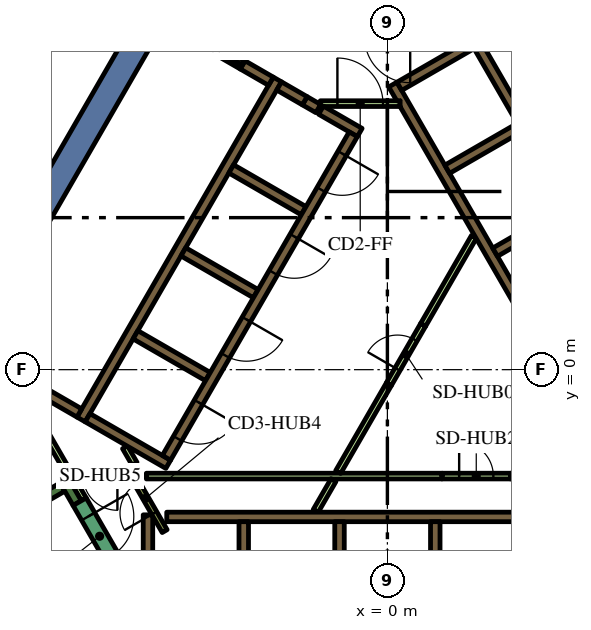
"""IFC4 building model, lengths in metres.
Left out: names, types, materials, properties, quantities, classifications, styles, units other than length and angle.
Written with IfcOpenShell. Run it as: python <this file> out.ifc"""

import sys

from ifc_helpers import new_model, si_unit, direction, frame, frame_2d, origin, place, context, subcontext, project, spatial, polyline, rectangle, outline, extrude, element, fill, save


model = new_model("IFC4")
c1 = context("Model", 3, precision=1e-05, world=origin(), true_north=direction((0.0, 1.0)))
c2 = subcontext(c1, "Body", "Model", "MODEL_VIEW")
j1 = project(units=[si_unit("LENGTHUNIT", "METRE"), si_unit("PLANEANGLEUNIT", "RADIAN")], contexts=[c1])
p1 = place(None, origin())
s1 = spatial("IfcSite", under=j1, at=p1, CompositionType="ELEMENT")
p2 = place(p1, origin())
s2 = spatial("IfcBuilding", under=s1, at=p2, CompositionType="ELEMENT")
p3 = place(p2, frame((0.0, 0.0, 210.0)))
s3 = spatial("IfcBuildingStorey", under=s2, at=p3, CompositionType="ELEMENT", Elevation=210.0)
p4 = place(p3, frame((8.235, 5.736, 0.0), z_axis=(0.0, 0.0, 1.0), x_axis=(-0.499983401189, 0.8660349869, 0.0)))
e1 = element("IfcWall", 1, at=p4, inside=s3, PredefinedType="SOLIDWALL", context=c2, shape_type="SweptSolid", body=[
    extrude(rectangle(XDim=12.472, YDim=0.7, at=frame_2d((6.236, 0.0))), origin(), (0.0, 0.0, 1.0), 4.2),
])
p5 = place(p3, frame((-4.696, 11.867, 0.0), z_axis=(0.0, 0.0, 1.0), x_axis=(-0.500003726532, -0.866023252259, 0.0)))
e2 = element("IfcWall", 2, at=p5, inside=s3, PredefinedType="SOLIDWALL", context=c2, shape_type="SweptSolid", body=[
    extrude(rectangle(XDim=12.848, YDim=0.7, at=frame_2d((6.424, 0.0))), origin(), (0.0, 0.0, 1.0), 4.2),
])
p6 = place(p3, frame((-14.44, -6.49, 0.0), z_axis=(0.0, 0.0, 1.0), x_axis=(0.866022966069, 0.500004222222, 0.0)))
e3 = element("IfcWall", 3, at=p6, inside=s3, PredefinedType="SOLIDWALL", context=c2, shape_type="SweptSolid", body=[
    extrude(rectangle(XDim=6.8, YDim=0.25, at=frame_2d((3.4, 0.0))), origin(), (0.0, 0.0, 1.0), 4.2),
])
p7 = place(p3, frame((-8.163, -3.511, 0.0), z_axis=(0.0, 0.0, 1.0), x_axis=(-0.499994068514, 0.866028828302, 0.0)))
e4 = element("IfcWall", 4, at=p7, inside=s3, PredefinedType="SOLIDWALL", context=c2, shape_type="SweptSolid", body=[
    extrude(rectangle(XDim=0.674, YDim=0.25, at=frame_2d((0.337, 0.0))), origin(), (0.0, 0.0, 1.0), 4.2),
])
p8 = place(p3, frame((-6.3, -9.05, 0.0), z_axis=(0.0, 0.0, 1.0), x_axis=(0.0, 1.0, 0.0)))
e5 = element("IfcWall", 5, at=p8, inside=s3, PredefinedType="SOLIDWALL", context=c2, shape_type="SweptSolid", body=[
    extrude(rectangle(XDim=5.23, YDim=0.25, at=frame_2d((2.615, 0.0))), origin(), (0.0, 0.0, 1.0), 4.2),
])
p9 = place(p3, frame((-5.806, -3.875, 0.0), z_axis=(0.0, 0.0, 1.0), x_axis=(1.0, 0.0, 0.0)))
e6 = element("IfcWall", 6, at=p9, inside=s3, PredefinedType="SOLIDWALL", context=c2, shape_type="SweptSolid", body=[
    extrude(rectangle(XDim=12.231, YDim=0.25, at=frame_2d((6.116, 0.0))), origin(), (0.0, 0.0, 1.0), 4.2),
])
for number, where, z_axis, x_axis in (
    (7, (1.26, -4.0, 0.0), (0.0, 0.0, 1.0), (0.0, -1.0, 0.0)),
    (8, (-1.26, -4.0, 0.0), (0.0, 0.0, 1.0), (0.0, -1.0, 0.0)),
    (9, (-3.78, -4.0, 0.0), (0.0, 0.0, 1.0), (0.0, -1.0, 0.0)),
):
    element("IfcWall", number, at=place(p3, frame(where, z_axis=z_axis, x_axis=x_axis)), inside=s3, PredefinedType="SOLIDWALL", context=c2, shape_type="SweptSolid", body=[
        extrude(rectangle(XDim=2.2, YDim=0.25, at=frame_2d((1.1, 0.0))), origin(), (0.0, 0.0, 1.0), 4.2),
    ])
p10 = place(p3, origin())
e10 = element("IfcWall", 10, at=p10, inside=s3, PredefinedType="SOLIDWALL", context=c2, shape_type="SweptSolid", body=[
    extrude(outline(polyline([(0.332, 6.925), (0.335, 6.925), (0.335, 6.925), (0.335, 6.925), (0.335, 7.075), (0.335, 7.075), (0.335, 7.075), (0.245, 7.075), (0.035, 7.439), (0.252, 7.564), (0.377, 7.348), (1.512, 5.382), (1.637, 5.165), (2.221, 4.153), (2.771, 3.199), (2.896, 2.983), (3.138, 2.564), (4.031, 1.017), (4.156, 0.801), (5.292, -1.165), (5.417, -1.382), (6.073, -2.519), (6.552, -3.348), (6.677, -3.564), (6.46, -3.689), (0.332, 6.925)])), origin(), (0.0, 0.0, 1.0), 4.2),
])
p11 = place(p3, frame((3.1, 9.064, 0.0), z_axis=(0.0, 0.0, 1.0), x_axis=(-0.866030133475, -0.499991807846, 0.0)))
e11 = element("IfcWall", 11, at=p11, inside=s3, PredefinedType="SOLIDWALL", context=c2, shape_type="SweptSolid", body=[
    extrude(rectangle(XDim=3.217, YDim=0.25, at=frame_2d((1.608, 0.0))), origin(), (0.0, 0.0, 1.0), 4.2),
])
p12 = place(p3, frame((1.574, 5.274, 0.0), z_axis=(0.0, 0.0, 1.0), x_axis=(0.866028486751, 0.499994660107, 0.0)))
e12 = element("IfcWall", 12, at=p12, inside=s3, PredefinedType="SOLIDWALL", context=c2, shape_type="SweptSolid", body=[
    extrude(rectangle(XDim=2.2, YDim=0.25, at=frame_2d((1.1, 0.0))), origin(), (0.0, 0.0, 1.0), 4.2),
])
p13 = place(p3, frame((2.834, 3.091, 0.0), z_axis=(0.0, 0.0, 1.0), x_axis=(0.866008176907, 0.50002983664, 0.0)))
e13 = element("IfcWall", 13, at=p13, inside=s3, PredefinedType="SOLIDWALL", context=c2, shape_type="SweptSolid", body=[
    extrude(rectangle(XDim=2.2, YDim=0.25, at=frame_2d((1.1, 0.0))), origin(), (0.0, 0.0, 1.0), 4.2),
])
p14 = place(p3, frame((-8.06, -1.311, 0.0), z_axis=(0.0, 0.0, 1.0), x_axis=(0.50000273126, 0.866023826885, 0.0)))
e14 = element("IfcWall", 14, at=p14, inside=s3, PredefinedType="SOLIDWALL", context=c2, shape_type="SweptSolid", body=[
    extrude(rectangle(XDim=10.33, YDim=0.25, at=frame_2d((5.165, 0.0))), origin(), (0.0, 0.0, 1.0), 4.2),
])
p15 = place(p3, frame((-1.819, 6.87, 0.0), z_axis=(0.0, 0.0, 1.0), x_axis=(-0.866294599386, 0.499533449405, 0.0)))
e15 = element("IfcWall", 15, at=p15, inside=s3, PredefinedType="SOLIDWALL", context=c2, shape_type="SweptSolid", body=[
    extrude(rectangle(XDim=0.41, YDim=0.25, at=frame_2d((0.205, 0.0))), origin(), (0.0, 0.0, 1.0), 4.2),
])
p16 = place(p3, frame((-2.849, 7.465, 0.0), z_axis=(0.0, 0.0, 1.0), x_axis=(0.865955664968, -0.500120771724, 0.0)))
e16 = element("IfcWall", 16, at=p16, inside=s3, PredefinedType="SOLIDWALL", context=c2, shape_type="SweptSolid", body=[
    extrude(rectangle(XDim=0.778, YDim=0.25, at=frame_2d((0.389, 0.0))), origin(), (0.0, 0.0, 1.0), 4.2),
])
p17 = place(p3, frame((-0.728, 6.24, 0.0), z_axis=(0.0, 0.0, 1.0), x_axis=(-0.866002680491, 0.500039355833, 0.0)))
e17 = element("IfcWall", 17, at=p17, inside=s3, PredefinedType="SOLIDWALL", context=c2, shape_type="SweptSolid", body=[
    extrude(rectangle(XDim=1.178, YDim=0.25, at=frame_2d((0.589, 0.0))), origin(), (0.0, 0.0, 1.0), 4.2),
])
for number, where, z_axis, x_axis in (
    (18, (-2.204, 4.182, 0.0), (0.0, 0.0, 1.0), (-0.866, 0.5, 0.0)),
    (19, (-5.369, 3.1, 0.0), (0.0, 0.0, 1.0), (0.866, -0.5, 0.0)),
    (20, (-4.724, -0.182, 0.0), (0.0, 0.0, 1.0), (-0.866, 0.5, 0.0)),
):
    element("IfcWall", number, at=place(p3, frame(where, z_axis=z_axis, x_axis=x_axis)), inside=s3, PredefinedType="SOLIDWALL", context=c2, shape_type="SweptSolid", body=[
        extrude(rectangle(XDim=2.2, YDim=0.25, at=frame_2d((1.1, 0.0))), origin(), (0.0, 0.0, 1.0), 4.2),
    ])
p18 = place(p3, frame((-7.889, -1.265, 0.0), z_axis=(0.0, 0.0, 1.0), x_axis=(0.866057815567, -0.499943856944, 0.0)))
e21 = element("IfcWall", 21, at=p18, inside=s3, PredefinedType="SOLIDWALL", context=c2, shape_type="SweptSolid", body=[
    extrude(rectangle(XDim=2.45, YDim=0.25, at=frame_2d((1.225, 0.0))), origin(), (0.0, 0.0, 1.0), 4.2),
])
p19 = place(p3, frame((-9.95, -0.075, 0.0), z_axis=(0.0, 0.0, 1.0), x_axis=(0.865962177421, -0.500109495288, 0.0)))
e22 = element("IfcWall", 22, at=p19, inside=s3, PredefinedType="SOLIDWALL", context=c2, shape_type="SweptSolid", body=[
    extrude(rectangle(XDim=2.129, YDim=0.25, at=frame_2d((1.065, 0.0))), origin(), (0.0, 0.0, 1.0), 4.2),
])
p20 = place(p3, frame((-3.809, 8.019, 0.0), z_axis=(0.0, 0.0, 1.0), x_axis=(0.866010229787, -0.500026281214, 0.0)))
e23 = element("IfcWall", 23, at=p20, inside=s3, PredefinedType="SOLIDWALL", context=c2, shape_type="SweptSolid", body=[
    extrude(rectangle(XDim=0.858, YDim=0.25, at=frame_2d((0.429, 0.0))), origin(), (0.0, 0.0, 1.0), 4.2),
])
e24 = element("IfcWall", 24, at=p10, inside=s3, PredefinedType="SOLIDWALL", context=c2, shape_type="SweptSolid", body=[
    extrude(outline(polyline([(-3.748, 8.128), (-3.813, 8.015), (-4.027, 8.139), (-4.017, 8.156), (-4.008, 8.173), (-4.0, 8.192), (-3.995, 8.21), (-3.991, 8.23), (-3.99, 8.25), (-3.99, 8.268), (-3.748, 8.128)])), origin(), (0.0, 0.0, 1.0), 4.2),
])
p21 = place(p3, frame((-9.718, -0.417, 0.0), z_axis=(0.0, 0.0, 1.0), x_axis=(0.499966538646, -0.866044721844, 0.0)))
e25 = element("IfcWall", 25, at=p21, inside=s3, PredefinedType="PARTITIONING", context=c2, shape_type="SweptSolid", body=[
    extrude(rectangle(XDim=2.511, YDim=0.15, at=frame_2d((1.255, 0.0))), origin(), (0.0, 0.0, 1.0), 3.45),
])
p22 = place(p3, frame((0.941, 1.179, 0.0), z_axis=(0.0, 0.0, 1.0), x_axis=(0.499962406319, 0.866047107418, 0.0)))
e26 = element("IfcWall", 26, at=p22, inside=s3, PredefinedType="PARTITIONING", context=c2, shape_type="SweptSolid", body=[
    extrude(rectangle(XDim=2.672, YDim=0.15, at=frame_2d((1.336, 0.0))), origin(), (0.0, 0.0, 1.0), 3.45),
])
p23 = place(p3, frame((1.438, -2.8, 0.0), z_axis=(0.0, 0.0, 1.0), x_axis=(-1.0, 0.0, 0.0)))
e27 = element("IfcWall", 27, at=p23, inside=s3, PredefinedType="PARTITIONING", context=c2, shape_type="SweptSolid", body=[
    extrude(rectangle(XDim=7.781, YDim=0.15, at=frame_2d((3.891, 0.0))), origin(), (0.0, 0.0, 1.0), 3.45),
])
p24 = place(p3, frame((-1.418, -2.907, 0.0), z_axis=(0.0, 0.0, 1.0), x_axis=(-0.499978056798, -0.866038072327, 0.0)))
e28 = element("IfcWall", 28, at=p24, inside=s3, PredefinedType="PARTITIONING", context=c2, shape_type="SweptSolid", body=[
    extrude(rectangle(XDim=0.937, YDim=0.15, at=frame_2d((0.469, 0.0))), origin(), (0.0, 0.0, 1.0), 3.45),
])
for number, where, z_axis, x_axis in (
    (29, (-1.295, -2.693, 0.0), (0.0, 0.0, 1.0), (0.5, 0.866, 0.0)),
    (30, (3.238, -2.8, 0.0), (0.0, 0.0, 1.0), (1.0, 0.0, 0.0)),
):
    element("IfcWall", number, at=place(p3, frame(where, z_axis=z_axis, x_axis=x_axis)), inside=s3, PredefinedType="PARTITIONING", context=c2, shape_type="SweptSolid", body=[
        extrude(rectangle(XDim=2.672, YDim=0.15, at=frame_2d((1.336, 0.0))), origin(), (0.0, 0.0, 1.0), 3.45),
    ])
p25 = place(p3, frame((-6.653, -2.477, 0.0), z_axis=(0.0, 0.0, 1.0), x_axis=(-0.500002592159, 0.866023907196, 0.0)))
e31 = element("IfcWall", 31, at=p25, inside=s3, PredefinedType="PARTITIONING", context=c2, shape_type="SweptSolid", body=[
    extrude(rectangle(XDim=0.503, YDim=0.15, at=frame_2d((0.251, 0.0))), origin(), (0.0, 0.0, 1.0), 3.45),
])
p26 = place(p3, frame((-7.99, -3.412, 0.0), z_axis=(0.0, 0.0, 1.0), x_axis=(-0.499858525911, 0.866107068482, 0.0)))
e32 = element("IfcWall", 32, at=p26, inside=s3, PredefinedType="PARTITIONING", context=c2, shape_type="SweptSolid", body=[
    extrude(rectangle(XDim=0.466, YDim=0.15, at=frame_2d((0.233, 0.0))), origin(), (0.0, 0.0, 1.0), 3.45),
])
p27 = place(p3, frame((8.565, -2.185, 0.0), z_axis=(0.0, 0.0, 1.0), x_axis=(-0.499997954832, 0.866026584559, 0.0)))
e33 = element("IfcWall", 33, at=p27, inside=s3, PredefinedType="SOLIDWALL", context=c2, shape_type="SweptSolid", body=[
    extrude(rectangle(XDim=12.35, YDim=0.25, at=frame_2d((6.175, 0.0))), origin(), (0.0, 0.0, 1.0), 4.2),
])
p28 = place(p27, frame((0.585, 0.0, 0.0)))
e34 = element("IfcOpeningElement", 34, at=p28, cuts=e33, PredefinedType="OPENING", context=c2, shape_type="SweptSolid", body=[
    extrude(rectangle(XDim=1.1, YDim=2.1, at=frame_2d((0.55, 1.05))), frame((0.0, 0.135, 0.0), z_axis=(0.0, -1.0, 0.0), x_axis=(1.0, 0.0, 0.0)), (0.0, 0.0, 1.0), 0.27),
])
p29 = place(p3, frame((-0.898, 6.194, 0.0), z_axis=(0.0, 0.0, 1.0), x_axis=(-0.499996202215, -0.866027596426, 0.0)))
e35 = element("IfcWall", 35, at=p29, inside=s3, PredefinedType="SOLIDWALL", context=c2, shape_type="SweptSolid", body=[
    extrude(rectangle(XDim=9.83, YDim=0.25, at=frame_2d((4.915, 0.0))), origin(), (0.0, 0.0, 1.0), 4.2),
])
p30 = place(p29, frame((0.585, 0.0, 0.0)))
e36 = element("IfcOpeningElement", 36, at=p30, cuts=e35, PredefinedType="OPENING", context=c2, shape_type="SweptSolid", body=[
    extrude(rectangle(XDim=1.1, YDim=2.1, at=frame_2d((0.55, 1.05))), frame((0.0, 0.135, 0.0), z_axis=(0.0, -1.0, 0.0), x_axis=(1.0, 0.0, 0.0)), (0.0, 0.0, 1.0), 0.27),
])
p31 = place(p29, frame((3.105, 0.0, 0.0)))
e37 = element("IfcOpeningElement", 37, at=p31, cuts=e35, PredefinedType="OPENING", context=c2, shape_type="SweptSolid", body=[
    extrude(rectangle(XDim=1.1, YDim=2.1, at=frame_2d((0.55, 1.05))), frame((0.0, 0.135, 0.0), z_axis=(0.0, -1.0, 0.0), x_axis=(1.0, 0.0, 0.0)), (0.0, 0.0, 1.0), 0.27),
])
p32 = place(p29, frame((5.625, 0.0, 0.0)))
e38 = element("IfcOpeningElement", 38, at=p32, cuts=e35, PredefinedType="OPENING", context=c2, shape_type="SweptSolid", body=[
    extrude(rectangle(XDim=1.1, YDim=2.1, at=frame_2d((0.55, 1.05))), frame((0.0, 0.135, 0.0), z_axis=(0.0, -1.0, 0.0), x_axis=(1.0, 0.0, 0.0)), (0.0, 0.0, 1.0), 0.27),
])
p33 = place(p29, frame((8.145, 0.0, 0.0)))
e39 = element("IfcOpeningElement", 39, at=p33, cuts=e35, PredefinedType="OPENING", context=c2, shape_type="SweptSolid", body=[
    extrude(rectangle(XDim=1.1, YDim=2.1, at=frame_2d((0.55, 1.05))), frame((0.0, 0.135, 0.0), z_axis=(0.0, -1.0, 0.0), x_axis=(1.0, 0.0, 0.0)), (0.0, 0.0, 1.0), 0.27),
])
p34 = place(p3, frame((-8.098, -3.474, 0.0), z_axis=(0.0, 0.0, 1.0), x_axis=(0.49994051562, -0.866059744384, 0.0)))
e40 = element("IfcWall", 40, at=p34, inside=s3, PredefinedType="SOLIDWALL", context=c2, shape_type="SweptSolid", body=[
    extrude(rectangle(XDim=2.1, YDim=0.4, at=frame_2d((1.05, 0.0))), origin(), (0.0, 0.0, 1.0), 4.2),
])
p35 = place(p34, frame((0.45, 0.0, 0.0)))
e41 = element("IfcOpeningElement", 41, at=p35, cuts=e40, PredefinedType="OPENING", context=c2, shape_type="SweptSolid", body=[
    extrude(rectangle(XDim=1.2, YDim=2.1, at=frame_2d((0.6, 1.05))), frame((0.0, 0.21, 0.0), z_axis=(0.0, -1.0, 0.0), x_axis=(1.0, 0.0, 0.0)), (0.0, 0.0, 1.0), 0.42),
])
p36 = place(p3, frame((-1.765, 7.0, 0.0), z_axis=(0.0, 0.0, 1.0), x_axis=(1.0, 0.0, 0.0)))
e42 = element("IfcWall", 42, at=p36, inside=s3, PredefinedType="PARTITIONING", context=c2, shape_type="SweptSolid", body=[
    extrude(rectangle(XDim=2.1, YDim=0.15, at=frame_2d((1.05, 0.0))), origin(), (0.0, 0.0, 1.0), 3.45),
])
p37 = place(p36, frame((0.45, 0.0, 0.0)))
e43 = element("IfcOpeningElement", 43, at=p37, cuts=e42, PredefinedType="OPENING", context=c2, shape_type="SweptSolid", body=[
    extrude(rectangle(XDim=1.2, YDim=2.1, at=frame_2d((0.6, 1.05))), frame((0.0, 0.085, 0.0), z_axis=(0.0, -1.0, 0.0), x_axis=(1.0, 0.0, 0.0)), (0.0, 0.0, 1.0), 0.17),
])
p38 = place(p3, frame((-5.861, -4.248, 0.0), z_axis=(0.0, 0.0, 1.0), x_axis=(-0.500043646338, 0.866000203093, 0.0)))
e44 = element("IfcWall", 44, at=p38, inside=s3, PredefinedType="PARTITIONING", context=c2, shape_type="SweptSolid", body=[
    extrude(rectangle(XDim=1.93, YDim=0.15, at=frame_2d((0.965, 0.0))), origin(), (0.0, 0.0, 1.0), 4.2),
])
p39 = place(p38, frame((0.55, 0.0, 0.0)))
e45 = element("IfcOpeningElement", 45, at=p39, cuts=e44, PredefinedType="OPENING", context=c2, shape_type="SweptSolid", body=[
    extrude(rectangle(XDim=0.9, YDim=2.1, at=frame_2d((0.45, 1.05))), frame((0.0, 0.085, 0.0), z_axis=(0.0, -1.0, 0.0), x_axis=(1.0, 0.0, 0.0)), (0.0, 0.0, 1.0), 0.17),
])
p40 = place(p3, frame((-5.659, 9.012, 0.0), z_axis=(0.0, 0.0, 1.0), x_axis=(0.866009402589, -0.500027713859, 0.0)))
e46 = element("IfcWall", 46, at=p40, inside=s3, PredefinedType="PARTITIONING", context=c2, shape_type="SweptSolid", body=[
    extrude(rectangle(XDim=2.1, YDim=0.12, at=frame_2d((1.05, 0.0))), origin(), (0.0, 0.0, 1.0), 3.45),
])
p41 = place(p40, frame((0.45, 0.0, 0.0)))
e47 = element("IfcOpeningElement", 47, at=p41, cuts=e46, PredefinedType="OPENING", context=c2, shape_type="SweptSolid", body=[
    extrude(rectangle(XDim=1.2, YDim=2.1, at=frame_2d((0.6, 1.05))), frame((0.0, 0.07, 0.0), z_axis=(0.0, -1.0, 0.0), x_axis=(1.0, 0.0, 0.0)), (0.0, 0.0, 1.0), 0.14),
])
p42 = place(p3, frame((0.041, -0.379, 0.0), z_axis=(0.0, 0.0, 1.0), x_axis=(0.499961193289, 0.866047807691, 0.0)))
e48 = element("IfcWall", 48, at=p42, inside=s3, PredefinedType="PARTITIONING", context=c2, shape_type="SweptSolid", body=[
    extrude(rectangle(XDim=1.8, YDim=0.15, at=frame_2d((0.9, 0.0))), origin(), (0.0, 0.0, 1.0), 3.45),
])
p43 = place(p42, frame((0.45, 0.0, 0.0)))
e49 = element("IfcOpeningElement", 49, at=p43, cuts=e48, PredefinedType="OPENING", context=c2, shape_type="SweptSolid", body=[
    extrude(rectangle(XDim=0.9, YDim=2.1, at=frame_2d((0.45, 1.05))), frame((0.0, 0.085, 0.0), z_axis=(0.0, -1.0, 0.0), x_axis=(1.0, 0.0, 0.0)), (0.0, 0.0, 1.0), 0.17),
])
p44 = place(p3, frame((1.438, -2.8, 0.0), z_axis=(0.0, 0.0, 1.0), x_axis=(1.0, 0.0, 0.0)))
e50 = element("IfcWall", 50, at=p44, inside=s3, PredefinedType="PARTITIONING", context=c2, shape_type="SweptSolid", body=[
    extrude(rectangle(XDim=1.8, YDim=0.15, at=frame_2d((0.9, 0.0))), origin(), (0.0, 0.0, 1.0), 3.45),
])
p45 = place(p44, frame((0.45, 0.0, 0.0)))
e51 = element("IfcOpeningElement", 51, at=p45, cuts=e50, PredefinedType="OPENING", context=c2, shape_type="SweptSolid", body=[
    extrude(rectangle(XDim=0.9, YDim=2.1, at=frame_2d((0.45, 1.05))), frame((0.0, 0.085, 0.0), z_axis=(0.0, -1.0, 0.0), x_axis=(1.0, 0.0, 0.0)), (0.0, 0.0, 1.0), 0.17),
])
p46 = place(p3, frame((-6.655, -2.8, 0.0), z_axis=(0.0, 0.0, 1.0), x_axis=(-1.0, 0.0, 0.0)))
e52 = element("IfcWall", 52, at=p46, inside=s3, PredefinedType="PARTITIONING", context=c2, shape_type="SweptSolid", body=[
    extrude(rectangle(XDim=1.8, YDim=0.15, at=frame_2d((0.9, 0.0))), origin(), (0.0, 0.0, 1.0), 3.45),
])
p47 = place(p46, frame((0.45, 0.0, 0.0)))
e53 = element("IfcOpeningElement", 53, at=p47, cuts=e52, PredefinedType="OPENING", context=c2, shape_type="SweptSolid", body=[
    extrude(rectangle(XDim=0.9, YDim=2.1, at=frame_2d((0.45, 1.05))), frame((0.0, 0.085, 0.0), z_axis=(0.0, -1.0, 0.0), x_axis=(1.0, 0.0, 0.0)), (0.0, 0.0, 1.0), 0.17),
])
p48 = place(p3, frame((-8.272, 9.972, 0.0), z_axis=(0.0, 0.0, 1.0), x_axis=(-0.5000018851, -0.866024315419, 0.0)))
e54 = element("IfcWall", 54, at=p48, inside=s3, PredefinedType="PARTITIONING", context=c2, shape_type="SweptSolid", body=[
    extrude(rectangle(XDim=9.0, YDim=0.2, at=frame_2d((4.5, 0.0))), origin(), (0.0, 0.0, 1.0), 3.45),
])
p49 = place(p30, origin())
e55 = element("IfcDoor", 55, at=p49, inside=s3, OperationType="DOUBLE_DOOR_SLIDING", PredefinedType="DOOR", context=c2, shape_type="SweptSolid", body=[
    extrude(rectangle(XDim=1.1, YDim=2.1, at=frame_2d((0.55, 1.05))), frame((0.0, 0.025, 0.0), z_axis=(0.0, -1.0, 0.0), x_axis=(1.0, 0.0, 0.0)), (0.0, 0.0, 1.0), 0.05),
])
fill(e36, e55)
p50 = place(p31, origin())
e56 = element("IfcDoor", 56, at=p50, inside=s3, OperationType="DOUBLE_DOOR_SLIDING", PredefinedType="DOOR", context=c2, shape_type="SweptSolid", body=[
    extrude(rectangle(XDim=1.1, YDim=2.1, at=frame_2d((0.55, 1.05))), frame((0.0, 0.025, 0.0), z_axis=(0.0, -1.0, 0.0), x_axis=(1.0, 0.0, 0.0)), (0.0, 0.0, 1.0), 0.05),
])
fill(e37, e56)
p51 = place(p32, origin())
e57 = element("IfcDoor", 57, at=p51, inside=s3, OperationType="DOUBLE_DOOR_SLIDING", PredefinedType="DOOR", context=c2, shape_type="SweptSolid", body=[
    extrude(rectangle(XDim=1.1, YDim=2.1, at=frame_2d((0.55, 1.05))), frame((0.0, 0.025, 0.0), z_axis=(0.0, -1.0, 0.0), x_axis=(1.0, 0.0, 0.0)), (0.0, 0.0, 1.0), 0.05),
])
fill(e38, e57)
p52 = place(p33, origin())
e58 = element("IfcDoor", 58, at=p52, inside=s3, OperationType="DOUBLE_DOOR_SLIDING", PredefinedType="DOOR", context=c2, shape_type="SweptSolid", body=[
    extrude(rectangle(XDim=1.1, YDim=2.1, at=frame_2d((0.55, 1.05))), frame((0.0, 0.025, 0.0), z_axis=(0.0, -1.0, 0.0), x_axis=(1.0, 0.0, 0.0)), (0.0, 0.0, 1.0), 0.05),
])
fill(e39, e58)
p53 = place(p35, origin())
e59 = element("IfcDoor", 59, at=p53, inside=s3, OperationType="SINGLE_SWING_LEFT", PredefinedType="DOOR", context=c2, shape_type="SweptSolid", body=[
    extrude(rectangle(XDim=1.2, YDim=2.1, at=frame_2d((0.6, 1.05))), frame((0.0, 0.025, 0.0), z_axis=(0.0, -1.0, 0.0), x_axis=(1.0, 0.0, 0.0)), (0.0, 0.0, 1.0), 0.05),
])
fill(e41, e59)
p54 = place(p37, origin())
e60 = element("IfcDoor", 60, at=p54, inside=s3, OperationType="SINGLE_SWING_LEFT", PredefinedType="DOOR", context=c2, shape_type="SweptSolid", body=[
    extrude(rectangle(XDim=1.2, YDim=2.1, at=frame_2d((0.6, 1.05))), frame((0.0, 0.025, 0.0), z_axis=(0.0, -1.0, 0.0), x_axis=(1.0, 0.0, 0.0)), (0.0, 0.0, 1.0), 0.05),
])
fill(e43, e60)
p55 = place(p39, origin())
e61 = element("IfcDoor", 61, at=p55, inside=s3, OperationType="SINGLE_SWING_LEFT", PredefinedType="DOOR", context=c2, shape_type="SweptSolid", body=[
    extrude(rectangle(XDim=0.9, YDim=2.1, at=frame_2d((0.45, 1.05))), frame((0.0, 0.025, 0.0), z_axis=(0.0, -1.0, 0.0), x_axis=(1.0, 0.0, 0.0)), (0.0, 0.0, 1.0), 0.05),
])
fill(e45, e61)
p56 = place(p41, origin())
e62 = element("IfcDoor", 62, at=p56, inside=s3, OperationType="SINGLE_SWING_LEFT", PredefinedType="DOOR", context=c2, shape_type="SweptSolid", body=[
    extrude(rectangle(XDim=1.2, YDim=2.1, at=frame_2d((0.6, 1.05))), frame((0.0, 0.025, 0.0), z_axis=(0.0, -1.0, 0.0), x_axis=(1.0, 0.0, 0.0)), (0.0, 0.0, 1.0), 0.05),
])
fill(e47, e62)
p57 = place(p43, origin())
e63 = element("IfcDoor", 63, at=p57, inside=s3, OperationType="SINGLE_SWING_LEFT", PredefinedType="DOOR", context=c2, shape_type="SweptSolid", body=[
    extrude(rectangle(XDim=0.9, YDim=2.1, at=frame_2d((0.45, 1.05))), frame((0.0, 0.025, 0.0), z_axis=(0.0, -1.0, 0.0), x_axis=(1.0, 0.0, 0.0)), (0.0, 0.0, 1.0), 0.05),
])
fill(e49, e63)
p58 = place(p45, origin())
e64 = element("IfcDoor", 64, at=p58, inside=s3, OperationType="SINGLE_SWING_LEFT", PredefinedType="DOOR", context=c2, shape_type="SweptSolid", body=[
    extrude(rectangle(XDim=0.9, YDim=2.1, at=frame_2d((0.45, 1.05))), frame((0.0, 0.025, 0.0), z_axis=(0.0, -1.0, 0.0), x_axis=(1.0, 0.0, 0.0)), (0.0, 0.0, 1.0), 0.05),
])
fill(e51, e64)
p59 = place(p47, origin())
e65 = element("IfcDoor", 65, at=p59, inside=s3, OperationType="SINGLE_SWING_LEFT", PredefinedType="DOOR", context=c2, shape_type="SweptSolid", body=[
    extrude(rectangle(XDim=0.9, YDim=2.1, at=frame_2d((0.45, 1.05))), frame((0.0, 0.025, 0.0), z_axis=(0.0, -1.0, 0.0), x_axis=(1.0, 0.0, 0.0)), (0.0, 0.0, 1.0), 0.05),
])
fill(e53, e65)
save(model, sys.argv[1])
